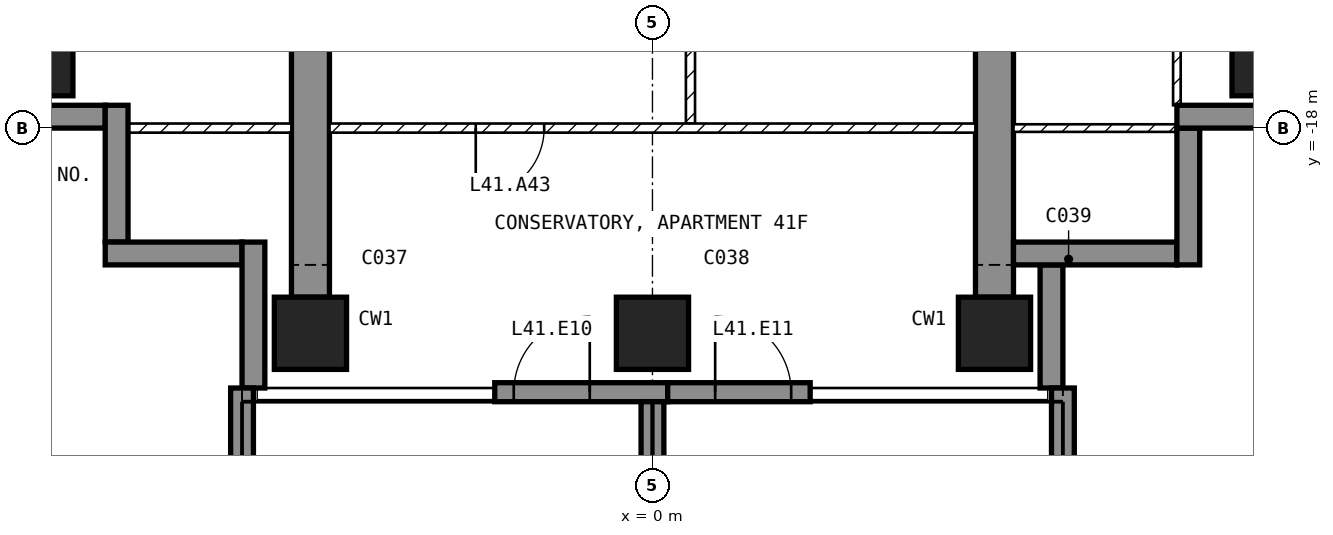
"""IFC4 building model, lengths in metres.
Left out: names, types, materials, properties, quantities, classifications, styles, units other than length and angle.
Written with IfcOpenShell. Run it as: python <this file> out.ifc"""

import sys

from ifc_helpers import new_model, si_unit, direction, frame, frame_2d, origin, origin_2d, place, context, subcontext, project, spatial, polyline, rectangle, outline, extrude, element, fill, save


model = new_model("IFC4")
c1 = context("Model", 3, precision=1e-05, world=origin(), true_north=direction((0.0, 1.0)))
c2 = subcontext(c1, "Body", "Model", "MODEL_VIEW")
j1 = project(units=[si_unit("LENGTHUNIT", "METRE"), si_unit("PLANEANGLEUNIT", "RADIAN")], contexts=[c1])
p1 = place(None, origin())
s1 = spatial("IfcSite", under=j1, at=p1, CompositionType="ELEMENT")
p2 = place(p1, origin())
s2 = spatial("IfcBuilding", under=s1, at=p2, CompositionType="ELEMENT")
p3 = place(p2, frame((0.0, 0.0, 170.1)))
s3 = spatial("IfcBuildingStorey", under=s2, at=p3, CompositionType="ELEMENT", Elevation=170.1)
for number, where, z_axis, x_axis in (
    (1, (-8.1, -17.1, -0.25), (0.0, 0.0, 1.0), (1.0, 0.0, 0.0)),
    (2, (-4.5, -20.7, -0.25), (0.0, 0.0, 1.0), (1.0, 0.0, 0.0)),
    (3, (0.0, -20.7, -0.25), (0.0, 0.0, 1.0), (1.0, 0.0, 0.0)),
    (4, (4.5, -20.7, -0.25), (0.0, 0.0, 1.0), (1.0, 0.0, 0.0)),
    (5, (8.1, -17.1, -0.25), (0.0, 0.0, 1.0), (1.0, 0.0, 0.0)),
):
    element("IfcColumn", number, at=place(p3, frame(where, z_axis=z_axis, x_axis=x_axis)), inside=s3, PredefinedType="COLUMN", context=c2, shape_type="SweptSolid", body=[
        extrude(rectangle(XDim=0.95, YDim=0.95, at=origin_2d()), origin(), (0.0, 0.0, 1.0), 3.5),
    ])
for number, where, z_axis, x_axis in (
    (6, (-4.75, -20.225, -0.25), (1.0, 0.0, 0.0), (0.0, 1.0, 0.0)),
    (7, (4.25, -20.225, -0.25), (1.0, 0.0, 0.0), (0.0, 1.0, 0.0)),
):
    element("IfcWall", number, at=place(p3, frame(where, z_axis=z_axis, x_axis=x_axis)), inside=s3, PredefinedType="SHEAR", context=c2, shape_type="SweptSolid", body=[
        extrude(outline(polyline([(0.0, 0.0), (6.725, 0.0), (6.725, 2.65), (9.125, 2.65), (9.125, 0.0), (11.225, 0.0), (11.225, 3.5), (0.0, 3.5), (0.0, 0.0)])), origin(), (0.0, 0.0, 1.0), 0.5),
    ])
p4 = place(p3, frame((-2.075, -21.475, 0.0), z_axis=(0.0, 0.0, 1.0), x_axis=(1.0, 0.0, 0.0)))
e8 = element("IfcWall", 8, at=p4, inside=s3, PredefinedType="SOLIDWALL", context=c2, shape_type="SweptSolid", body=[
    extrude(rectangle(XDim=2.275, YDim=0.25, at=frame_2d((1.137, 0.0))), origin(), (0.0, 0.0, 1.0), 3.25),
])
p5 = place(p4, frame((0.25, 0.0, 0.0)))
e9 = element("IfcOpeningElement", 9, at=p5, cuts=e8, PredefinedType="OPENING", context=c2, shape_type="SweptSolid", body=[
    extrude(rectangle(XDim=1.0, YDim=2.4, at=frame_2d((0.5, 1.2))), frame((0.0, 0.135, 0.0), z_axis=(0.0, -1.0, 0.0), x_axis=(1.0, 0.0, 0.0)), (0.0, 0.0, 1.0), 0.27),
])
p6 = place(p3, frame((0.2, -21.475, 0.0), z_axis=(0.0, 0.0, 1.0), x_axis=(1.0, 0.0, 0.0)))
e10 = element("IfcWall", 10, at=p6, inside=s3, PredefinedType="SOLIDWALL", context=c2, shape_type="SweptSolid", body=[
    extrude(rectangle(XDim=1.875, YDim=0.25, at=frame_2d((0.938, 0.0))), origin(), (0.0, 0.0, 1.0), 3.25),
])
p7 = place(p6, frame((0.625, 0.0, 0.0)))
e11 = element("IfcOpeningElement", 11, at=p7, cuts=e10, PredefinedType="OPENING", context=c2, shape_type="SweptSolid", body=[
    extrude(rectangle(XDim=1.0, YDim=2.4, at=frame_2d((0.5, 1.2))), frame((0.0, 0.135, 0.0), z_axis=(0.0, -1.0, 0.0), x_axis=(1.0, 0.0, 0.0)), (0.0, 0.0, 1.0), 0.27),
])
p8 = place(p3, frame((5.25, -21.42, 0.0), z_axis=(0.0, 0.0, 1.0), x_axis=(0.0, 1.0, 0.0)))
e12 = element("IfcWall", 12, at=p8, inside=s3, PredefinedType="SOLIDWALL", context=c2, shape_type="SweptSolid", body=[
    extrude(rectangle(XDim=1.62, YDim=0.3, at=frame_2d((0.81, 0.0))), origin(), (0.0, 0.0, 1.0), 3.25),
])
p9 = place(p3, frame((4.75, -19.65, 0.0), z_axis=(0.0, 0.0, 1.0), x_axis=(1.0, 0.0, 0.0)))
e13 = element("IfcWall", 13, at=p9, inside=s3, PredefinedType="SOLIDWALL", context=c2, shape_type="SweptSolid", body=[
    extrude(rectangle(XDim=2.15, YDim=0.3, at=frame_2d((1.075, 0.0))), origin(), (0.0, 0.0, 1.0), 3.25),
])
p10 = place(p3, frame((7.05, -19.8, 0.0), z_axis=(0.0, 0.0, 1.0), x_axis=(0.0, 1.0, 0.0)))
e14 = element("IfcWall", 14, at=p10, inside=s3, PredefinedType="SOLIDWALL", context=c2, shape_type="SweptSolid", body=[
    extrude(rectangle(XDim=1.8, YDim=0.3, at=frame_2d((0.9, 0.0))), origin(), (0.0, 0.0, 1.0), 3.25),
])
p11 = place(p3, frame((6.9, -17.85, 0.0), z_axis=(0.0, 0.0, 1.0), x_axis=(1.0, 0.0, 0.0)))
e15 = element("IfcWall", 15, at=p11, inside=s3, PredefinedType="SOLIDWALL", context=c2, shape_type="SweptSolid", body=[
    extrude(rectangle(XDim=1.85, YDim=0.3, at=frame_2d((0.925, 0.0))), origin(), (0.0, 0.0, 1.0), 3.25),
])
p12 = place(p3, frame((-8.75, -17.85, 0.0), z_axis=(0.0, 0.0, 1.0), x_axis=(1.0, 0.0, 0.0)))
e16 = element("IfcWall", 16, at=p12, inside=s3, PredefinedType="SOLIDWALL", context=c2, shape_type="SweptSolid", body=[
    extrude(rectangle(XDim=1.55, YDim=0.3, at=frame_2d((0.775, 0.0))), origin(), (0.0, 0.0, 1.0), 3.25),
])
for number, where, z_axis, x_axis in (
    (17, (-7.05, -17.7, 0.0), (0.0, 0.0, 1.0), (0.0, -1.0, 0.0)),
    (18, (-7.2, -19.65, 0.0), (0.0, 0.0, 1.0), (1.0, 0.0, 0.0)),
):
    element("IfcWall", number, at=place(p3, frame(where, z_axis=z_axis, x_axis=x_axis)), inside=s3, PredefinedType="SOLIDWALL", context=c2, shape_type="SweptSolid", body=[
        extrude(rectangle(XDim=1.8, YDim=0.3, at=frame_2d((0.9, 0.0))), origin(), (0.0, 0.0, 1.0), 3.25),
    ])
p13 = place(p3, frame((-5.25, -19.5, 0.0), z_axis=(0.0, 0.0, 1.0), x_axis=(0.0, -1.0, 0.0)))
e19 = element("IfcWall", 19, at=p13, inside=s3, PredefinedType="SOLIDWALL", context=c2, shape_type="SweptSolid", body=[
    extrude(rectangle(XDim=1.92, YDim=0.3, at=frame_2d((0.96, 0.0))), origin(), (0.0, 0.0, 1.0), 3.25),
])
p14 = place(p3, frame((-5.4, -21.42, 0.0), z_axis=(0.0, 0.0, 1.0), x_axis=(0.0, -1.0, 0.0)))
e20 = element("IfcWall", 20, at=p14, inside=s3, PredefinedType="SOLIDWALL", context=c2, shape_type="SweptSolid", body=[
    extrude(rectangle(XDim=2.88, YDim=0.3, at=frame_2d((1.44, 0.0))), origin(), (0.0, 0.0, 1.0), 3.25),
])
p15 = place(p3, frame((0.0, -21.6, 0.0), z_axis=(0.0, 0.0, 1.0), x_axis=(0.0, -1.0, 0.0)))
e21 = element("IfcWall", 21, at=p15, inside=s3, PredefinedType="SOLIDWALL", context=c2, shape_type="SweptSolid", body=[
    extrude(rectangle(XDim=2.7, YDim=0.3, at=frame_2d((1.35, 0.0))), origin(), (0.0, 0.0, 1.0), 3.25),
])
p16 = place(p3, frame((5.4, -21.42, 0.0), z_axis=(0.0, 0.0, 1.0), x_axis=(0.0, -1.0, 0.0)))
e22 = element("IfcWall", 22, at=p16, inside=s3, PredefinedType="SOLIDWALL", context=c2, shape_type="SweptSolid", body=[
    extrude(rectangle(XDim=2.88, YDim=0.3, at=frame_2d((1.44, 0.0))), origin(), (0.0, 0.0, 1.0), 3.25),
])
p17 = place(p3, frame((0.5, -15.06, 0.0), z_axis=(0.0, 0.0, 1.0), x_axis=(0.0, -1.0, 0.0)))
e23 = element("IfcWall", 23, at=p17, inside=s3, PredefinedType="PARTITIONING", context=c2, shape_type="SweptSolid", body=[
    extrude(rectangle(XDim=2.88, YDim=0.12, at=frame_2d((1.44, 0.0))), origin(), (0.0, 0.0, 1.0), 3.25),
])
p18 = place(p3, frame((4.25, -18.0, 0.0), z_axis=(0.0, 0.0, 1.0), x_axis=(-1.0, 0.0, 0.0)))
e24 = element("IfcWall", 24, at=p18, inside=s3, PredefinedType="PARTITIONING", context=c2, shape_type="SweptSolid", body=[
    extrude(rectangle(XDim=8.5, YDim=0.12, at=frame_2d((4.25, 0.0))), origin(), (0.0, 0.0, 1.0), 3.25),
])
p19 = place(p18, frame((5.675, 0.0, 0.0)))
e25 = element("IfcOpeningElement", 25, at=p19, cuts=e24, PredefinedType="OPENING", context=c2, shape_type="SweptSolid", body=[
    extrude(rectangle(XDim=0.9, YDim=2.1, at=frame_2d((0.45, 1.05))), frame((0.0, 0.07, 0.0), z_axis=(0.0, -1.0, 0.0), x_axis=(1.0, 0.0, 0.0)), (0.0, 0.0, 1.0), 0.14),
])
p20 = place(p3, frame((6.9, -17.7, 0.0), z_axis=(0.0, 0.0, 1.0), x_axis=(0.0, 1.0, 0.0)))
e26 = element("IfcWall", 26, at=p20, inside=s3, PredefinedType="PARTITIONING", context=c2, shape_type="SweptSolid", body=[
    extrude(rectangle(XDim=3.25, YDim=0.1, at=frame_2d((1.625, 0.0))), origin(), (0.0, 0.0, 1.0), 3.25),
])
p21 = place(p20, frame((2.05, 0.0, 0.0)))
e27 = element("IfcOpeningElement", 27, at=p21, cuts=e26, PredefinedType="OPENING", context=c2, shape_type="SweptSolid", body=[
    extrude(rectangle(XDim=0.85, YDim=2.1, at=frame_2d((0.425, 1.05))), frame((0.0, 0.06, 0.0), z_axis=(0.0, -1.0, 0.0), x_axis=(1.0, 0.0, 0.0)), (0.0, 0.0, 1.0), 0.12),
])
p22 = place(p3, frame((7.12, -18.0, 0.0), z_axis=(0.0, 0.0, 1.0), x_axis=(-1.0, 0.0, 0.0)))
e28 = element("IfcWall", 28, at=p22, inside=s3, PredefinedType="PARTITIONING", context=c2, shape_type="SweptSolid", body=[
    extrude(rectangle(XDim=2.37, YDim=0.1, at=frame_2d((1.185, 0.0))), origin(), (0.0, 0.0, 1.0), 3.25),
])
p23 = place(p3, frame((-4.75, -18.0, 0.0), z_axis=(0.0, 0.0, 1.0), x_axis=(-1.0, 0.0, 0.0)))
e29 = element("IfcWall", 29, at=p23, inside=s3, PredefinedType="PARTITIONING", context=c2, shape_type="SweptSolid", body=[
    extrude(rectangle(XDim=2.37, YDim=0.12, at=frame_2d((1.185, 0.0))), origin(), (0.0, 0.0, 1.0), 3.25),
])
p24 = place(p5, origin())
e30 = element("IfcDoor", 30, at=p24, inside=s3, OperationType="SINGLE_SWING_RIGHT", PredefinedType="DOOR", context=c2, shape_type="SweptSolid", body=[
    extrude(rectangle(XDim=1.0, YDim=2.4, at=frame_2d((0.5, 1.2))), frame((0.0, 0.025, 0.0), z_axis=(0.0, -1.0, 0.0), x_axis=(1.0, 0.0, 0.0)), (0.0, 0.0, 1.0), 0.05),
])
fill(e9, e30)
p25 = place(p7, origin())
e31 = element("IfcDoor", 31, at=p25, inside=s3, OperationType="SINGLE_SWING_LEFT", PredefinedType="DOOR", context=c2, shape_type="SweptSolid", body=[
    extrude(rectangle(XDim=1.0, YDim=2.4, at=frame_2d((0.5, 1.2))), frame((0.0, 0.025, 0.0), z_axis=(0.0, -1.0, 0.0), x_axis=(1.0, 0.0, 0.0)), (0.0, 0.0, 1.0), 0.05),
])
fill(e11, e31)
p26 = place(p19, origin())
e32 = element("IfcDoor", 32, at=p26, inside=s3, OperationType="SINGLE_SWING_RIGHT", PredefinedType="DOOR", context=c2, shape_type="SweptSolid", body=[
    extrude(rectangle(XDim=0.9, YDim=2.1, at=frame_2d((0.45, 1.05))), frame((0.0, 0.025, 0.0), z_axis=(0.0, -1.0, 0.0), x_axis=(1.0, 0.0, 0.0)), (0.0, 0.0, 1.0), 0.05),
])
fill(e25, e32)
save(model, sys.argv[1])
